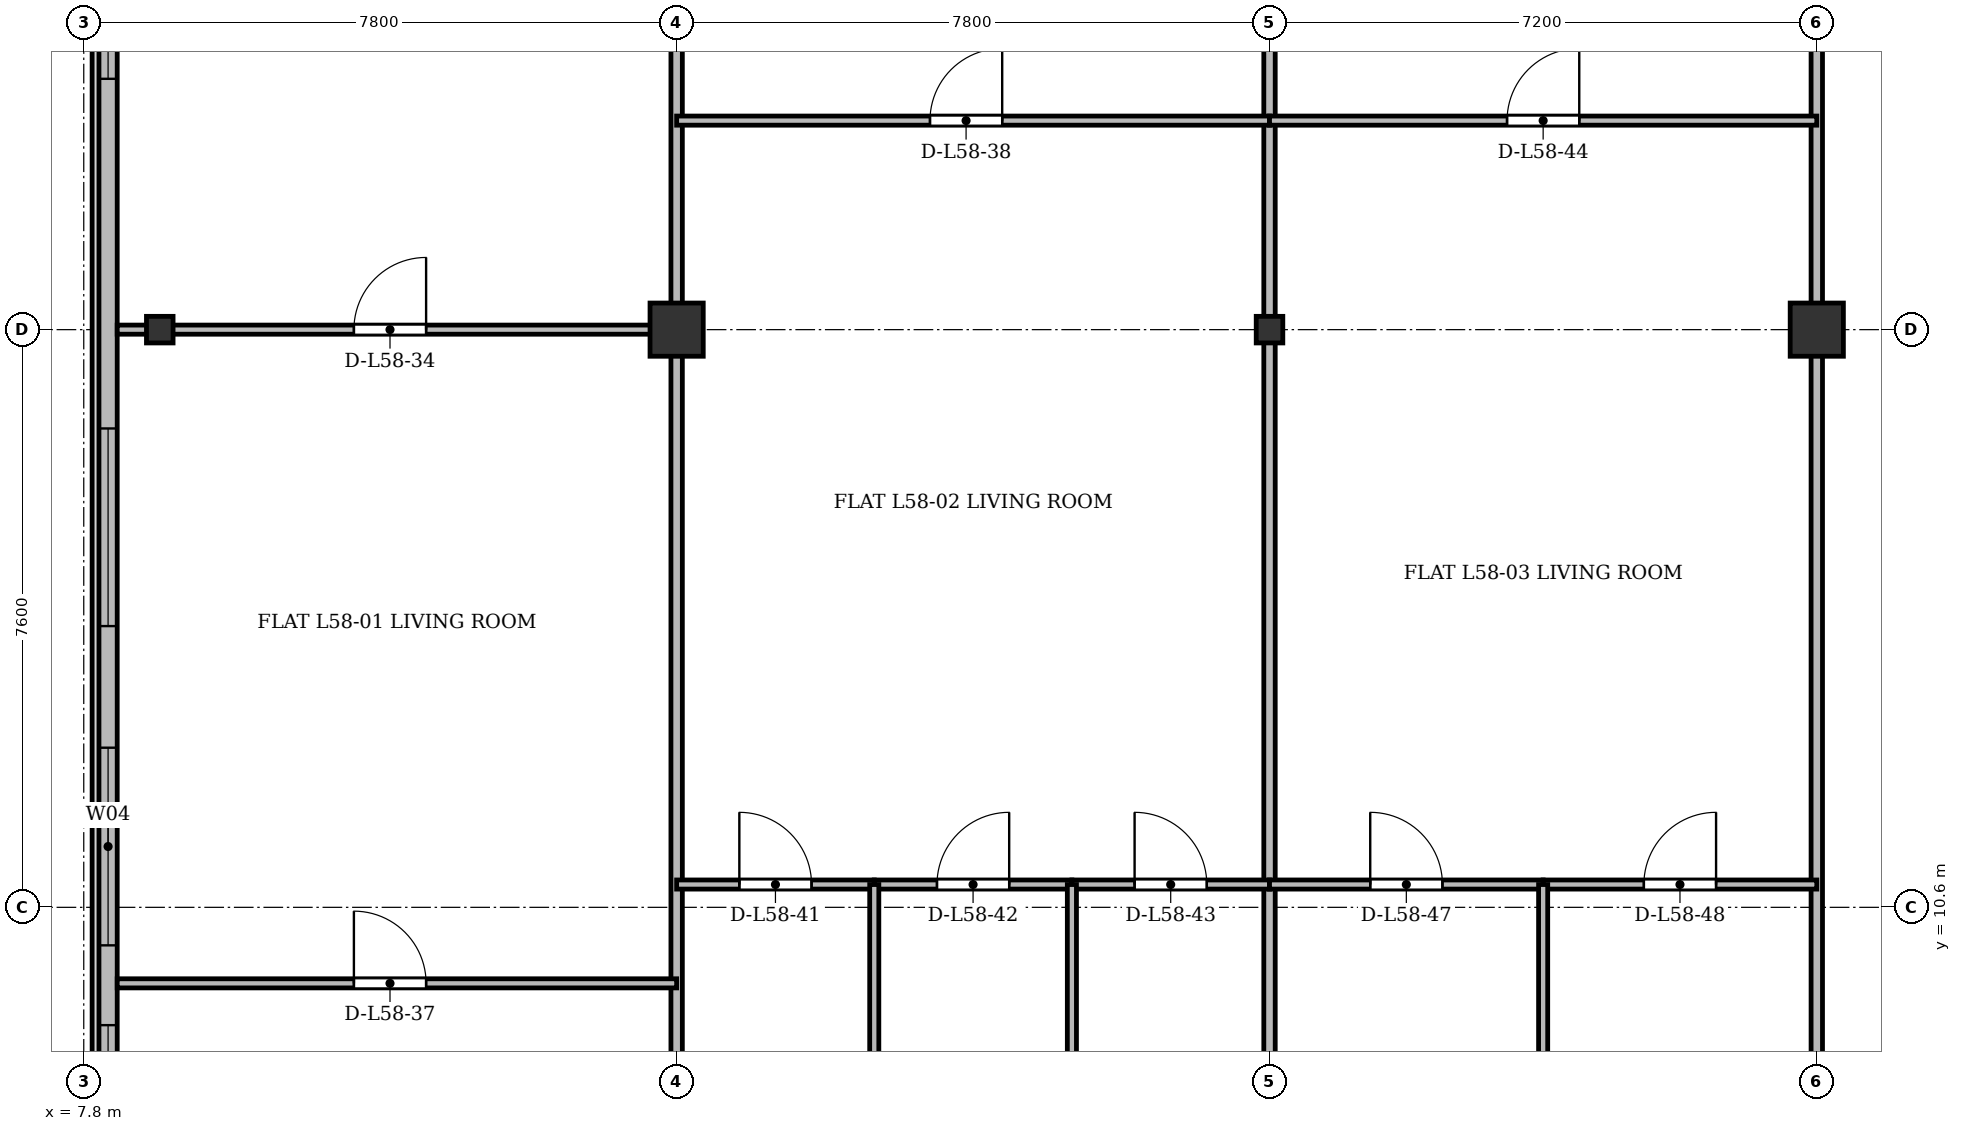
"""IFC4 building model, lengths in metres.
Left out: names, types, materials, properties, quantities, classifications, styles, units other than length and angle.
Written with IfcOpenShell. Run it as: python <this file> out.ifc"""

import sys

from ifc_helpers import new_model, si_unit, direction, frame, frame_2d, origin, origin_2d, place, context, subcontext, project, spatial, rectangle, i_section, extrude, source, transform, mapped, element, fill, save


model = new_model("IFC4")
c1 = context("Model", 3, precision=1e-05, world=origin(), true_north=direction((0.0, 1.0)))
c2 = subcontext(c1, "Body", "Model", "MODEL_VIEW")
j1 = project(units=[si_unit("LENGTHUNIT", "METRE"), si_unit("PLANEANGLEUNIT", "RADIAN")], contexts=[c1])
p1 = place(None, origin())
s1 = spatial("IfcSite", under=j1, at=p1, CompositionType="ELEMENT")
p2 = place(p1, origin())
s2 = spatial("IfcBuilding", under=s1, at=p2, CompositionType="ELEMENT")
p3 = place(p2, frame((0.0, 0.0, 222.9)))
s3 = spatial("IfcBuildingStorey", under=s2, at=p3, CompositionType="ELEMENT", Elevation=222.9)
m1 = source(origin(), c2, "Body", "SweptSolid", [
    extrude(i_section(OverallWidth=0.35, OverallDepth=0.35, WebThickness=0.018, FlangeThickness=0.028, at=origin_2d()), origin(), (0.0, 0.0, 1.0), 3.6),
])
p4 = place(p3, frame((8.8, 18.2, 0.0), z_axis=(0.0, 0.0, 1.0), x_axis=(1.0, 0.0, 0.0)))
e1 = element("IfcColumn", 1, at=p4, inside=s3, PredefinedType="COLUMN", context=c2, shape_type="MappedRepresentation", body=[
    mapped(m1, transform((0.0, 0.0, 0.0), x_axis=(1.0, 0.0, 0.0), y_axis=(0.0, 1.0, 0.0), z_axis=(0.0, 0.0, 1.0), scale=1.0)),
])
m2 = source(origin(), c2, "Body", "SweptSolid", [
    extrude(rectangle(XDim=0.7, YDim=0.7, at=origin_2d()), origin(), (0.0, 0.0, 1.0), 3.6),
])
p5 = place(p3, frame((15.6, 18.2, 0.0), z_axis=(0.0, 0.0, 1.0), x_axis=(1.0, 0.0, 0.0)))
e2 = element("IfcColumn", 2, at=p5, inside=s3, PredefinedType="COLUMN", context=c2, shape_type="MappedRepresentation", body=[
    mapped(m2, transform((0.0, 0.0, 0.0), x_axis=(1.0, 0.0, 0.0), y_axis=(0.0, 1.0, 0.0), z_axis=(0.0, 0.0, 1.0), scale=1.0)),
])
p6 = place(p3, frame((23.4, 18.2, 0.0), z_axis=(0.0, 0.0, 1.0), x_axis=(1.0, 0.0, 0.0)))
e3 = element("IfcColumn", 3, at=p6, inside=s3, PredefinedType="COLUMN", context=c2, shape_type="MappedRepresentation", body=[
    mapped(m1, transform((0.0, 0.0, 0.0), x_axis=(1.0, 0.0, 0.0), y_axis=(0.0, 1.0, 0.0), z_axis=(0.0, 0.0, 1.0), scale=1.0)),
])
p7 = place(p3, frame((30.6, 18.2, 0.0), z_axis=(0.0, 0.0, 1.0), x_axis=(1.0, 0.0, 0.0)))
e4 = element("IfcColumn", 4, at=p7, inside=s3, PredefinedType="COLUMN", context=c2, shape_type="MappedRepresentation", body=[
    mapped(m2, transform((0.0, 0.0, 0.0), x_axis=(1.0, 0.0, 0.0), y_axis=(0.0, 1.0, 0.0), z_axis=(0.0, 0.0, 1.0), scale=1.0)),
])
p8 = place(p3, frame((8.12, 6.4, 0.0), z_axis=(0.0, 0.0, 1.0), x_axis=(0.0, 1.0, 0.0)))
e5 = element("IfcWall", 5, at=p8, inside=s3, PredefinedType="SOLIDWALL", context=c2, shape_type="SweptSolid", body=[
    extrude(rectangle(XDim=39.1, YDim=0.24, at=frame_2d((19.55, 0.0))), origin(), (0.0, 0.0, 1.0), 3.36),
])
p9 = place(p8, frame((1.45, 0.0, 0.92)))
e6 = element("IfcOpeningElement", 6, at=p9, cuts=e5, PredefinedType="OPENING", context=c2, shape_type="SweptSolid", body=[
    extrude(rectangle(XDim=1.2, YDim=1.65, at=frame_2d((0.6, 0.825))), frame((0.0, 0.13, 0.0), z_axis=(0.0, -1.0, 0.0), x_axis=(1.0, 0.0, 0.0)), (0.0, 0.0, 1.0), 0.26),
])
p10 = place(p8, frame((3.7, 0.0, 0.92)))
e7 = element("IfcOpeningElement", 7, at=p10, cuts=e5, PredefinedType="OPENING", context=c2, shape_type="SweptSolid", body=[
    extrude(rectangle(XDim=2.6, YDim=1.9, at=frame_2d((1.3, 0.95))), frame((0.0, 0.13, 0.0), z_axis=(0.0, -1.0, 0.0), x_axis=(1.0, 0.0, 0.0)), (0.0, 0.0, 1.0), 0.26),
])
p11 = place(p8, frame((7.9, 0.0, 0.92)))
e8 = element("IfcOpeningElement", 8, at=p11, cuts=e5, PredefinedType="OPENING", context=c2, shape_type="SweptSolid", body=[
    extrude(rectangle(XDim=2.6, YDim=1.9, at=frame_2d((1.3, 0.95))), frame((0.0, 0.13, 0.0), z_axis=(0.0, -1.0, 0.0), x_axis=(1.0, 0.0, 0.0)), (0.0, 0.0, 1.0), 0.26),
])
p12 = place(p8, frame((15.1, 0.0, 0.92)))
e9 = element("IfcOpeningElement", 9, at=p12, cuts=e5, PredefinedType="OPENING", context=c2, shape_type="SweptSolid", body=[
    extrude(rectangle(XDim=2.6, YDim=1.9, at=frame_2d((1.3, 0.95))), frame((0.0, 0.13, 0.0), z_axis=(0.0, -1.0, 0.0), x_axis=(1.0, 0.0, 0.0)), (0.0, 0.0, 1.0), 0.26),
])
p13 = place(p8, frame((33.4, 0.0, 0.92)))
e10 = element("IfcOpeningElement", 10, at=p13, cuts=e5, PredefinedType="OPENING", context=c2, shape_type="SweptSolid", body=[
    extrude(rectangle(XDim=1.2, YDim=1.65, at=frame_2d((0.6, 0.825))), frame((0.0, 0.13, 0.0), z_axis=(0.0, -1.0, 0.0), x_axis=(1.0, 0.0, 0.0)), (0.0, 0.0, 1.0), 0.26),
])
p14 = place(p8, frame((36.75, 0.0, 0.92)))
e11 = element("IfcOpeningElement", 11, at=p14, cuts=e5, PredefinedType="OPENING", context=c2, shape_type="SweptSolid", body=[
    extrude(rectangle(XDim=1.2, YDim=1.65, at=frame_2d((0.6, 0.825))), frame((0.0, 0.13, 0.0), z_axis=(0.0, -1.0, 0.0), x_axis=(1.0, 0.0, 0.0)), (0.0, 0.0, 1.0), 0.26),
])
for number, where, z_axis, x_axis in (
    (12, (15.6, 3.625, 0.0), (0.0, 0.0, 1.0), (0.0, 1.0, 0.0)),
    (13, (23.4, 3.625, 0.0), (0.0, 0.0, 1.0), (0.0, 1.0, 0.0)),
    (14, (30.6, 3.625, 0.0), (0.0, 0.0, 1.0), (0.0, 1.0, 0.0)),
):
    element("IfcWall", number, at=place(p3, frame(where, z_axis=z_axis, x_axis=x_axis)), inside=s3, PredefinedType="PARTITIONING", context=c2, shape_type="SweptSolid", body=[
        extrude(rectangle(XDim=27.375, YDim=0.15, at=frame_2d((13.688, 0.0))), origin(), (0.0, 0.0, 1.0), 2.86),
    ])
p15 = place(p3, frame((8.24, 18.2, 0.0), z_axis=(0.0, 0.0, 1.0), x_axis=(1.0, 0.0, 0.0)))
e15 = element("IfcWall", 15, at=p15, inside=s3, PredefinedType="PARTITIONING", context=c2, shape_type="SweptSolid", body=[
    extrude(rectangle(XDim=7.36, YDim=0.12, at=frame_2d((3.68, 0.0))), origin(), (0.0, 0.0, 1.0), 2.91),
])
p16 = place(p15, frame((3.114, 0.0, 0.0)))
e16 = element("IfcOpeningElement", 16, at=p16, cuts=e15, PredefinedType="OPENING", context=c2, shape_type="SweptSolid", body=[
    extrude(rectangle(XDim=0.95, YDim=2.15, at=frame_2d((0.475, 1.075))), frame((0.0, 0.07, 0.0), z_axis=(0.0, -1.0, 0.0), x_axis=(1.0, 0.0, 0.0)), (0.0, 0.0, 1.0), 0.14),
])
p17 = place(p3, frame((8.24, 9.6, 0.0), z_axis=(0.0, 0.0, 1.0), x_axis=(1.0, 0.0, 0.0)))
e17 = element("IfcWall", 17, at=p17, inside=s3, PredefinedType="PARTITIONING", context=c2, shape_type="SweptSolid", body=[
    extrude(rectangle(XDim=7.36, YDim=0.12, at=frame_2d((3.68, 0.0))), origin(), (0.0, 0.0, 1.0), 2.86),
])
p18 = place(p17, frame((3.114, 0.0, 0.0)))
e18 = element("IfcOpeningElement", 18, at=p18, cuts=e17, PredefinedType="OPENING", context=c2, shape_type="SweptSolid", body=[
    extrude(rectangle(XDim=0.95, YDim=2.15, at=frame_2d((0.475, 1.075))), frame((0.0, 0.07, 0.0), z_axis=(0.0, -1.0, 0.0), x_axis=(1.0, 0.0, 0.0)), (0.0, 0.0, 1.0), 0.14),
])
p19 = place(p3, frame((15.6, 20.95, 0.0), z_axis=(0.0, 0.0, 1.0), x_axis=(1.0, 0.0, 0.0)))
e19 = element("IfcWall", 19, at=p19, inside=s3, PredefinedType="PARTITIONING", context=c2, shape_type="SweptSolid", body=[
    extrude(rectangle(XDim=7.8, YDim=0.12, at=frame_2d((3.9, 0.0))), origin(), (0.0, 0.0, 1.0), 2.86),
])
p20 = place(p19, frame((3.333, 0.0, 0.0)))
e20 = element("IfcOpeningElement", 20, at=p20, cuts=e19, PredefinedType="OPENING", context=c2, shape_type="SweptSolid", body=[
    extrude(rectangle(XDim=0.95, YDim=2.15, at=frame_2d((0.475, 1.075))), frame((0.0, 0.07, 0.0), z_axis=(0.0, -1.0, 0.0), x_axis=(1.0, 0.0, 0.0)), (0.0, 0.0, 1.0), 0.14),
])
p21 = place(p3, frame((15.6, 10.9, 0.0), z_axis=(0.0, 0.0, 1.0), x_axis=(1.0, 0.0, 0.0)))
e21 = element("IfcWall", 21, at=p21, inside=s3, PredefinedType="PARTITIONING", context=c2, shape_type="SweptSolid", body=[
    extrude(rectangle(XDim=2.6, YDim=0.12, at=frame_2d((1.3, 0.0))), origin(), (0.0, 0.0, 1.0), 2.86),
])
p22 = place(p21, frame((0.825, 0.0, 0.0)))
e22 = element("IfcOpeningElement", 22, at=p22, cuts=e21, PredefinedType="OPENING", context=c2, shape_type="SweptSolid", body=[
    extrude(rectangle(XDim=0.95, YDim=2.15, at=frame_2d((0.475, 1.075))), frame((0.0, 0.07, 0.0), z_axis=(0.0, -1.0, 0.0), x_axis=(1.0, 0.0, 0.0)), (0.0, 0.0, 1.0), 0.14),
])
p23 = place(p3, frame((18.2, 10.9, 0.0), z_axis=(0.0, 0.0, 1.0), x_axis=(1.0, 0.0, 0.0)))
e23 = element("IfcWall", 23, at=p23, inside=s3, PredefinedType="PARTITIONING", context=c2, shape_type="SweptSolid", body=[
    extrude(rectangle(XDim=2.6, YDim=0.12, at=frame_2d((1.3, 0.0))), origin(), (0.0, 0.0, 1.0), 3.06),
])
p24 = place(p23, frame((0.825, 0.0, 0.0)))
e24 = element("IfcOpeningElement", 24, at=p24, cuts=e23, PredefinedType="OPENING", context=c2, shape_type="SweptSolid", body=[
    extrude(rectangle(XDim=0.95, YDim=2.15, at=frame_2d((0.475, 1.075))), frame((0.0, 0.07, 0.0), z_axis=(0.0, -1.0, 0.0), x_axis=(1.0, 0.0, 0.0)), (0.0, 0.0, 1.0), 0.14),
])
p25 = place(p3, frame((18.2, 3.625, 0.0), z_axis=(0.0, 0.0, 1.0), x_axis=(0.0, 1.0, 0.0)))
e25 = element("IfcWall", 25, at=p25, inside=s3, PredefinedType="PARTITIONING", context=c2, shape_type="SweptSolid", body=[
    extrude(rectangle(XDim=7.275, YDim=0.12, at=frame_2d((3.637, 0.0))), origin(), (0.0, 0.0, 1.0), 2.91),
])
p26 = place(p3, frame((20.8, 10.9, 0.0), z_axis=(0.0, 0.0, 1.0), x_axis=(1.0, 0.0, 0.0)))
e26 = element("IfcWall", 26, at=p26, inside=s3, PredefinedType="PARTITIONING", context=c2, shape_type="SweptSolid", body=[
    extrude(rectangle(XDim=2.6, YDim=0.12, at=frame_2d((1.3, 0.0))), origin(), (0.0, 0.0, 1.0), 2.86),
])
p27 = place(p26, frame((0.825, 0.0, 0.0)))
e27 = element("IfcOpeningElement", 27, at=p27, cuts=e26, PredefinedType="OPENING", context=c2, shape_type="SweptSolid", body=[
    extrude(rectangle(XDim=0.95, YDim=2.15, at=frame_2d((0.475, 1.075))), frame((0.0, 0.07, 0.0), z_axis=(0.0, -1.0, 0.0), x_axis=(1.0, 0.0, 0.0)), (0.0, 0.0, 1.0), 0.14),
])
p28 = place(p3, frame((20.8, 3.625, 0.0), z_axis=(0.0, 0.0, 1.0), x_axis=(0.0, 1.0, 0.0)))
e28 = element("IfcWall", 28, at=p28, inside=s3, PredefinedType="PARTITIONING", context=c2, shape_type="SweptSolid", body=[
    extrude(rectangle(XDim=7.275, YDim=0.12, at=frame_2d((3.637, 0.0))), origin(), (0.0, 0.0, 1.0), 2.91),
])
p29 = place(p3, frame((23.4, 20.95, 0.0), z_axis=(0.0, 0.0, 1.0), x_axis=(1.0, 0.0, 0.0)))
e29 = element("IfcWall", 29, at=p29, inside=s3, PredefinedType="PARTITIONING", context=c2, shape_type="SweptSolid", body=[
    extrude(rectangle(XDim=7.2, YDim=0.12, at=frame_2d((3.6, 0.0))), origin(), (0.0, 0.0, 1.0), 2.86),
])
p30 = place(p29, frame((3.125, 0.0, 0.0)))
e30 = element("IfcOpeningElement", 30, at=p30, cuts=e29, PredefinedType="OPENING", context=c2, shape_type="SweptSolid", body=[
    extrude(rectangle(XDim=0.95, YDim=2.15, at=frame_2d((0.475, 1.075))), frame((0.0, 0.07, 0.0), z_axis=(0.0, -1.0, 0.0), x_axis=(1.0, 0.0, 0.0)), (0.0, 0.0, 1.0), 0.14),
])
p31 = place(p3, frame((23.4, 10.9, 0.0), z_axis=(0.0, 0.0, 1.0), x_axis=(1.0, 0.0, 0.0)))
e31 = element("IfcWall", 31, at=p31, inside=s3, PredefinedType="PARTITIONING", context=c2, shape_type="SweptSolid", body=[
    extrude(rectangle(XDim=3.6, YDim=0.12, at=frame_2d((1.8, 0.0))), origin(), (0.0, 0.0, 1.0), 2.86),
])
p32 = place(p31, frame((1.325, 0.0, 0.0)))
e32 = element("IfcOpeningElement", 32, at=p32, cuts=e31, PredefinedType="OPENING", context=c2, shape_type="SweptSolid", body=[
    extrude(rectangle(XDim=0.95, YDim=2.15, at=frame_2d((0.475, 1.075))), frame((0.0, 0.07, 0.0), z_axis=(0.0, -1.0, 0.0), x_axis=(1.0, 0.0, 0.0)), (0.0, 0.0, 1.0), 0.14),
])
p33 = place(p3, frame((27.0, 10.9, 0.0), z_axis=(0.0, 0.0, 1.0), x_axis=(1.0, 0.0, 0.0)))
e33 = element("IfcWall", 33, at=p33, inside=s3, PredefinedType="PARTITIONING", context=c2, shape_type="SweptSolid", body=[
    extrude(rectangle(XDim=3.6, YDim=0.12, at=frame_2d((1.8, 0.0))), origin(), (0.0, 0.0, 1.0), 2.86),
])
p34 = place(p33, frame((1.325, 0.0, 0.0)))
e34 = element("IfcOpeningElement", 34, at=p34, cuts=e33, PredefinedType="OPENING", context=c2, shape_type="SweptSolid", body=[
    extrude(rectangle(XDim=0.95, YDim=2.15, at=frame_2d((0.475, 1.075))), frame((0.0, 0.07, 0.0), z_axis=(0.0, -1.0, 0.0), x_axis=(1.0, 0.0, 0.0)), (0.0, 0.0, 1.0), 0.14),
])
p35 = place(p3, frame((27.0, 3.625, 0.0), z_axis=(0.0, 0.0, 1.0), x_axis=(0.0, 1.0, 0.0)))
e35 = element("IfcWall", 35, at=p35, inside=s3, PredefinedType="PARTITIONING", context=c2, shape_type="SweptSolid", body=[
    extrude(rectangle(XDim=7.275, YDim=0.12, at=frame_2d((3.637, 0.0))), origin(), (0.0, 0.0, 1.0), 2.91),
])
m3 = source(origin(), c2, "Body", "SweptSolid", [
    extrude(rectangle(XDim=1.2, YDim=1.65, at=frame_2d((0.6, 0.825))), frame((0.0, 0.03, 0.0), z_axis=(0.0, -1.0, 0.0), x_axis=(1.0, 0.0, 0.0)), (0.0, 0.0, 1.0), 0.06),
])
p36 = place(p9, origin())
e36 = element("IfcWindow", 36, at=p36, inside=s3, PartitioningType="SINGLE_PANEL", PredefinedType="WINDOW", context=c2, shape_type="MappedRepresentation", body=[
    mapped(m3, transform((0.0, 0.0, 0.0), x_axis=(1.0, 0.0, 0.0), y_axis=(0.0, 1.0, 0.0), z_axis=(0.0, 0.0, 1.0), scale=1.0)),
])
fill(e6, e36)
m4 = source(origin(), c2, "Body", "SweptSolid", [
    extrude(rectangle(XDim=2.6, YDim=1.9, at=frame_2d((1.3, 0.95))), frame((0.0, 0.03, 0.0), z_axis=(0.0, -1.0, 0.0), x_axis=(1.0, 0.0, 0.0)), (0.0, 0.0, 1.0), 0.06),
])
p37 = place(p10, origin())
e37 = element("IfcWindow", 37, at=p37, inside=s3, PartitioningType="SINGLE_PANEL", PredefinedType="WINDOW", context=c2, shape_type="MappedRepresentation", body=[
    mapped(m4, transform((0.0, 0.0, 0.0), x_axis=(1.0, 0.0, 0.0), y_axis=(0.0, 1.0, 0.0), z_axis=(0.0, 0.0, 1.0), scale=1.0)),
])
fill(e7, e37)
p38 = place(p11, origin())
e38 = element("IfcWindow", 38, at=p38, inside=s3, PartitioningType="SINGLE_PANEL", PredefinedType="WINDOW", context=c2, shape_type="MappedRepresentation", body=[
    mapped(m4, transform((0.0, 0.0, 0.0), x_axis=(1.0, 0.0, 0.0), y_axis=(0.0, 1.0, 0.0), z_axis=(0.0, 0.0, 1.0), scale=1.0)),
])
fill(e8, e38)
p39 = place(p12, origin())
e39 = element("IfcWindow", 39, at=p39, inside=s3, PartitioningType="SINGLE_PANEL", PredefinedType="WINDOW", context=c2, shape_type="MappedRepresentation", body=[
    mapped(m4, transform((0.0, 0.0, 0.0), x_axis=(1.0, 0.0, 0.0), y_axis=(0.0, 1.0, 0.0), z_axis=(0.0, 0.0, 1.0), scale=1.0)),
])
fill(e9, e39)
m5 = source(origin(), c2, "Body", "SweptSolid", [
    extrude(rectangle(XDim=0.95, YDim=2.15, at=frame_2d((0.475, 1.075))), frame((0.0, 0.025, 0.0), z_axis=(0.0, -1.0, 0.0), x_axis=(1.0, 0.0, 0.0)), (0.0, 0.0, 1.0), 0.05),
])
p40 = place(p16, origin())
e40 = element("IfcDoor", 40, at=p40, inside=s3, OperationType="SINGLE_SWING_RIGHT", PredefinedType="DOOR", context=c2, shape_type="MappedRepresentation", body=[
    mapped(m5, transform((0.0, 0.0, 0.0), x_axis=(1.0, 0.0, 0.0), y_axis=(0.0, 1.0, 0.0), z_axis=(0.0, 0.0, 1.0), scale=1.0)),
])
fill(e16, e40)
p41 = place(p18, origin())
e41 = element("IfcDoor", 41, at=p41, inside=s3, OperationType="SINGLE_SWING_LEFT", PredefinedType="DOOR", context=c2, shape_type="MappedRepresentation", body=[
    mapped(m5, transform((0.0, 0.0, 0.0), x_axis=(1.0, 0.0, 0.0), y_axis=(0.0, 1.0, 0.0), z_axis=(0.0, 0.0, 1.0), scale=1.0)),
])
fill(e18, e41)
p42 = place(p20, origin())
e42 = element("IfcDoor", 42, at=p42, inside=s3, OperationType="SINGLE_SWING_RIGHT", PredefinedType="DOOR", context=c2, shape_type="MappedRepresentation", body=[
    mapped(m5, transform((0.0, 0.0, 0.0), x_axis=(1.0, 0.0, 0.0), y_axis=(0.0, 1.0, 0.0), z_axis=(0.0, 0.0, 1.0), scale=1.0)),
])
fill(e20, e42)
p43 = place(p22, origin())
e43 = element("IfcDoor", 43, at=p43, inside=s3, OperationType="SINGLE_SWING_LEFT", PredefinedType="DOOR", context=c2, shape_type="MappedRepresentation", body=[
    mapped(m5, transform((0.0, 0.0, 0.0), x_axis=(1.0, 0.0, 0.0), y_axis=(0.0, 1.0, 0.0), z_axis=(0.0, 0.0, 1.0), scale=1.0)),
])
fill(e22, e43)
p44 = place(p24, origin())
e44 = element("IfcDoor", 44, at=p44, inside=s3, OperationType="SINGLE_SWING_RIGHT", PredefinedType="DOOR", context=c2, shape_type="MappedRepresentation", body=[
    mapped(m5, transform((0.0, 0.0, 0.0), x_axis=(1.0, 0.0, 0.0), y_axis=(0.0, 1.0, 0.0), z_axis=(0.0, 0.0, 1.0), scale=1.0)),
])
fill(e24, e44)
p45 = place(p27, origin())
e45 = element("IfcDoor", 45, at=p45, inside=s3, OperationType="SINGLE_SWING_LEFT", PredefinedType="DOOR", context=c2, shape_type="MappedRepresentation", body=[
    mapped(m5, transform((0.0, 0.0, 0.0), x_axis=(1.0, 0.0, 0.0), y_axis=(0.0, 1.0, 0.0), z_axis=(0.0, 0.0, 1.0), scale=1.0)),
])
fill(e27, e45)
p46 = place(p30, origin())
e46 = element("IfcDoor", 46, at=p46, inside=s3, OperationType="SINGLE_SWING_RIGHT", PredefinedType="DOOR", context=c2, shape_type="MappedRepresentation", body=[
    mapped(m5, transform((0.0, 0.0, 0.0), x_axis=(1.0, 0.0, 0.0), y_axis=(0.0, 1.0, 0.0), z_axis=(0.0, 0.0, 1.0), scale=1.0)),
])
fill(e30, e46)
p47 = place(p32, origin())
e47 = element("IfcDoor", 47, at=p47, inside=s3, OperationType="SINGLE_SWING_LEFT", PredefinedType="DOOR", context=c2, shape_type="MappedRepresentation", body=[
    mapped(m5, transform((0.0, 0.0, 0.0), x_axis=(1.0, 0.0, 0.0), y_axis=(0.0, 1.0, 0.0), z_axis=(0.0, 0.0, 1.0), scale=1.0)),
])
fill(e32, e47)
p48 = place(p34, origin())
e48 = element("IfcDoor", 48, at=p48, inside=s3, OperationType="SINGLE_SWING_RIGHT", PredefinedType="DOOR", context=c2, shape_type="MappedRepresentation", body=[
    mapped(m5, transform((0.0, 0.0, 0.0), x_axis=(1.0, 0.0, 0.0), y_axis=(0.0, 1.0, 0.0), z_axis=(0.0, 0.0, 1.0), scale=1.0)),
])
fill(e34, e48)
save(model, sys.argv[1])
